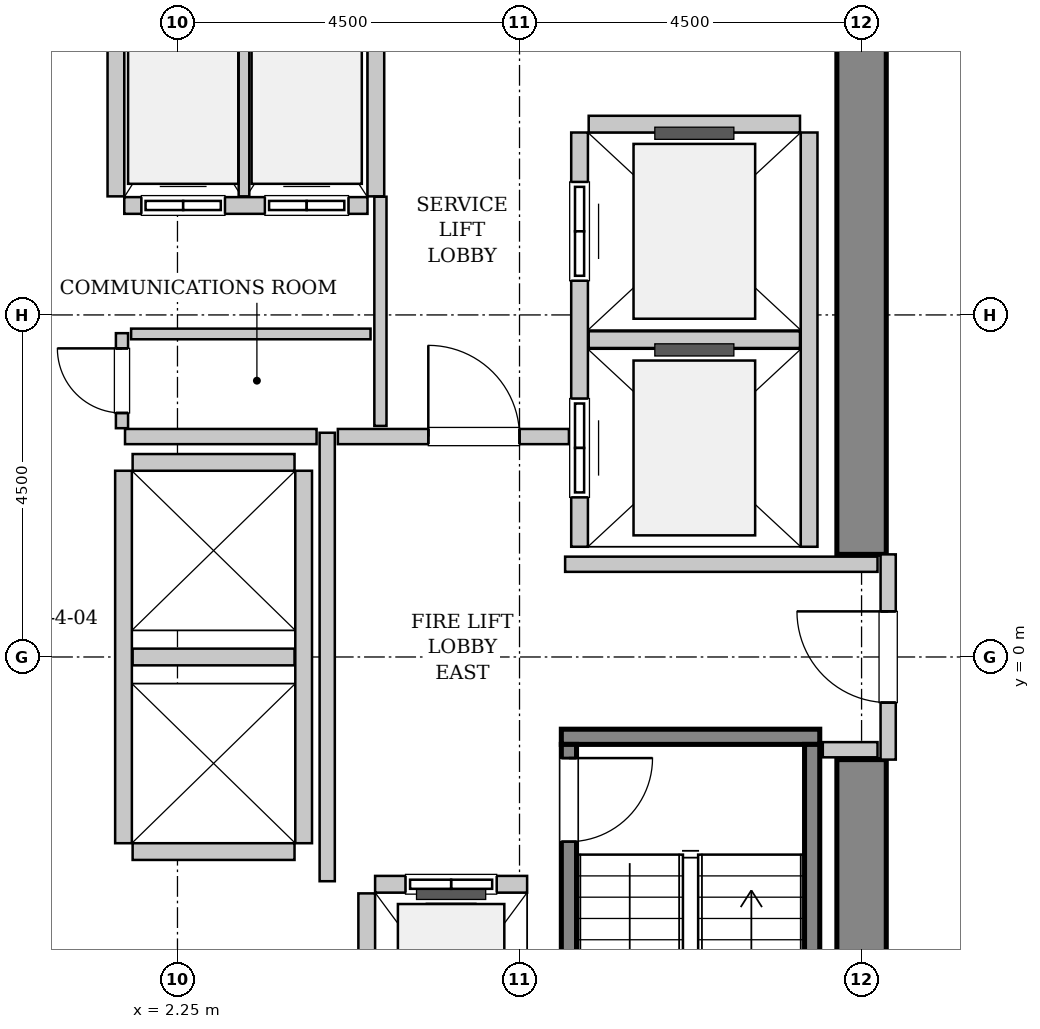
"""IFC4 building model, lengths in metres.
Left out: names, types, materials, properties, quantities, classifications, styles, units other than length and angle.
Written with IfcOpenShell. Run it as: python <this file> out.ifc"""

import sys

from ifc_helpers import new_model, si_unit, direction, frame, frame_2d, origin, place, context, subcontext, project, spatial, rectangle, extrude, source, transform, mapped, element, fill, save


model = new_model("IFC4")
c1 = context("Model", 3, precision=1e-05, world=origin(), true_north=direction((0.0, 1.0)))
c2 = subcontext(c1, "Body", "Model", "MODEL_VIEW")
j1 = project(units=[si_unit("LENGTHUNIT", "METRE"), si_unit("PLANEANGLEUNIT", "RADIAN")], contexts=[c1])
p1 = place(None, origin())
s1 = spatial("IfcSite", under=j1, at=p1, CompositionType="ELEMENT")
p2 = place(p1, origin())
s2 = spatial("IfcBuilding", under=s1, at=p2, CompositionType="ELEMENT")
p3 = place(p2, frame((0.0, 0.0, 11.4)))
s3 = spatial("IfcBuildingStorey", under=s2, at=p3, CompositionType="ELEMENT", Elevation=11.4)
m1 = source(origin(), c2, "Body", "SweptSolid", [
    extrude(rectangle(XDim=7.325, YDim=0.65, at=frame_2d((3.663, 0.0))), origin(), (0.0, 0.0, 1.0), 5.4),
])
for number, where, z_axis, x_axis in (
    (1, (11.25, -8.675, 0.0), (0.0, 0.0, 1.0), (0.0, 1.0, 0.0)),
    (2, (11.25, 1.35, 0.0), (0.0, 0.0, 1.0), (0.0, 1.0, 0.0)),
):
    element("IfcWall", number, at=place(p3, frame(where, z_axis=z_axis, x_axis=x_axis)), inside=s3, PredefinedType="SHEAR", context=c2, shape_type="MappedRepresentation", body=[
        mapped(m1, transform((0.0, 0.0, 0.0), x_axis=(1.0, 0.0, 0.0), y_axis=(0.0, 1.0, 0.0), z_axis=(0.0, 0.0, 1.0), scale=1.0)),
    ])
m2 = source(origin(), c2, "Body", "SweptSolid", [
    extrude(rectangle(XDim=3.4, YDim=0.2, at=frame_2d((1.7, 0.0))), origin(), (0.0, 0.0, 1.0), 5.4),
])
p4 = place(p3, frame((7.3, -1.05, 0.0), z_axis=(0.0, 0.0, 1.0), x_axis=(1.0, 0.0, 0.0)))
e3 = element("IfcWall", 3, at=p4, inside=s3, PredefinedType="SOLIDWALL", context=c2, shape_type="MappedRepresentation", body=[
    mapped(m2, transform((0.0, 0.0, 0.0), x_axis=(1.0, 0.0, 0.0), y_axis=(0.0, 1.0, 0.0), z_axis=(0.0, 0.0, 1.0), scale=1.0)),
])
m3 = source(origin(), c2, "Body", "SweptSolid", [
    extrude(rectangle(XDim=7.1, YDim=0.2, at=frame_2d((3.55, 0.0))), origin(), (0.0, 0.0, 1.0), 5.4),
])
p5 = place(p3, frame((7.4, -1.15, 0.0), z_axis=(0.0, 0.0, 1.0), x_axis=(0.0, -1.0, 0.0)))
e4 = element("IfcWall", 4, at=p5, inside=s3, PredefinedType="SOLIDWALL", context=c2, shape_type="MappedRepresentation", body=[
    mapped(m3, transform((0.0, 0.0, 0.0), x_axis=(1.0, 0.0, 0.0), y_axis=(0.0, 1.0, 0.0), z_axis=(0.0, 0.0, 1.0), scale=1.0)),
])
p6 = place(p5, frame((0.18, 0.0, 0.0)))
e5 = element("IfcOpeningElement", 5, at=p6, cuts=e4, PredefinedType="OPENING", context=c2, shape_type="SweptSolid", body=[
    extrude(rectangle(XDim=1.1, YDim=2.15, at=frame_2d((0.55, 1.075))), frame((0.0, 0.11, 0.0), z_axis=(0.0, -1.0, 0.0), x_axis=(1.0, 0.0, 0.0)), (0.0, 0.0, 1.0), 0.22),
])
p7 = place(p3, frame((10.6, -1.15, 0.0), z_axis=(0.0, 0.0, 1.0), x_axis=(0.0, -1.0, 0.0)))
e6 = element("IfcWall", 6, at=p7, inside=s3, PredefinedType="SOLIDWALL", context=c2, shape_type="MappedRepresentation", body=[
    mapped(m3, transform((0.0, 0.0, 0.0), x_axis=(1.0, 0.0, 0.0), y_axis=(0.0, 1.0, 0.0), z_axis=(0.0, 0.0, 1.0), scale=1.0)),
])
m4 = source(origin(), c2, "Body", "SweptSolid", [
    extrude(rectangle(XDim=2.0, YDim=0.22, at=frame_2d((1.0, 0.0))), origin(), (0.0, 0.0, 1.0), 5.085),
])
p8 = place(p3, frame((6.85, -2.99, 0.0), z_axis=(0.0, 0.0, 1.0), x_axis=(-1.0, 0.0, 0.0)))
e7 = element("IfcWall", 7, at=p8, inside=s3, PredefinedType="SOLIDWALL", context=c2, shape_type="MappedRepresentation", body=[
    mapped(m4, transform((0.0, 0.0, 0.0), x_axis=(1.0, 0.0, 0.0), y_axis=(0.0, 1.0, 0.0), z_axis=(0.0, 0.0, 1.0), scale=1.0)),
])
p9 = place(p8, frame((0.4, 0.0, 0.0)))
e8 = element("IfcOpeningElement", 8, at=p9, cuts=e7, PredefinedType="OPENING", context=c2, shape_type="SweptSolid", body=[
    extrude(rectangle(XDim=1.2, YDim=2.2, at=frame_2d((0.6, 1.1))), frame((0.0, 0.12, 0.0), z_axis=(0.0, -1.0, 0.0), x_axis=(1.0, 0.0, 0.0)), (0.0, 0.0, 1.0), 0.24),
])
m5 = source(origin(), c2, "Body", "SweptSolid", [
    extrude(rectangle(XDim=2.68, YDim=0.22, at=frame_2d((1.34, 0.0))), origin(), (0.0, 0.0, 1.0), 5.085),
])
p10 = place(p3, frame((4.74, -3.11, 0.0), z_axis=(0.0, 0.0, 1.0), x_axis=(0.0, -1.0, 0.0)))
e9 = element("IfcWall", 9, at=p10, inside=s3, PredefinedType="SOLIDWALL", context=c2, shape_type="MappedRepresentation", body=[
    mapped(m5, transform((0.0, 0.0, 0.0), x_axis=(1.0, 0.0, 0.0), y_axis=(0.0, 1.0, 0.0), z_axis=(0.0, 0.0, 1.0), scale=1.0)),
])
m6 = source(origin(), c2, "Body", "SweptSolid", [
    extrude(rectangle(XDim=5.45, YDim=0.22, at=frame_2d((2.725, 0.0))), origin(), (0.0, 0.0, 1.0), 5.085),
])
p11 = place(p3, frame((7.54, 6.9, 0.0), z_axis=(0.0, 0.0, 1.0), x_axis=(0.0, -1.0, 0.0)))
e10 = element("IfcWall", 10, at=p11, inside=s3, PredefinedType="SOLIDWALL", context=c2, shape_type="MappedRepresentation", body=[
    mapped(m6, transform((0.0, 0.0, 0.0), x_axis=(1.0, 0.0, 0.0), y_axis=(0.0, 1.0, 0.0), z_axis=(0.0, 0.0, 1.0), scale=1.0)),
])
p12 = place(p11, frame((3.5, 0.0, 0.0)))
e11 = element("IfcOpeningElement", 11, at=p12, cuts=e10, PredefinedType="OPENING", context=c2, shape_type="SweptSolid", body=[
    extrude(rectangle(XDim=1.3, YDim=2.3, at=frame_2d((0.65, 1.15))), frame((0.0, 0.12, 0.0), z_axis=(0.0, -1.0, 0.0), x_axis=(1.0, 0.0, 0.0)), (0.0, 0.0, 1.0), 0.24),
])
p13 = place(p11, frame((0.65, 0.0, 0.0)))
e12 = element("IfcOpeningElement", 12, at=p13, cuts=e10, PredefinedType="OPENING", context=c2, shape_type="SweptSolid", body=[
    extrude(rectangle(XDim=1.3, YDim=2.3, at=frame_2d((0.65, 1.15))), frame((0.0, 0.12, 0.0), z_axis=(0.0, -1.0, 0.0), x_axis=(1.0, 0.0, 0.0)), (0.0, 0.0, 1.0), 0.24),
])
p14 = place(p3, frame((10.56, 1.45, 0.0), z_axis=(0.0, 0.0, 1.0), x_axis=(0.0, 1.0, 0.0)))
e13 = element("IfcWall", 13, at=p14, inside=s3, PredefinedType="SOLIDWALL", context=c2, shape_type="MappedRepresentation", body=[
    mapped(m6, transform((0.0, 0.0, 0.0), x_axis=(1.0, 0.0, 0.0), y_axis=(0.0, 1.0, 0.0), z_axis=(0.0, 0.0, 1.0), scale=1.0)),
])
m7 = source(origin(), c2, "Body", "SweptSolid", [
    extrude(rectangle(XDim=2.78, YDim=0.22, at=frame_2d((1.39, 0.0))), origin(), (0.0, 0.0, 1.0), 5.085),
])
for number, where, z_axis, x_axis in (
    (14, (7.66, 4.175, 0.0), (0.0, 0.0, 1.0), (1.0, 0.0, 0.0)),
    (15, (10.44, 7.01, 0.0), (0.0, 0.0, 1.0), (-1.0, 0.0, 0.0)),
):
    element("IfcWall", number, at=place(p3, frame(where, z_axis=z_axis, x_axis=x_axis)), inside=s3, PredefinedType="SOLIDWALL", context=c2, shape_type="MappedRepresentation", body=[
        mapped(m7, transform((0.0, 0.0, 0.0), x_axis=(1.0, 0.0, 0.0), y_axis=(0.0, 1.0, 0.0), z_axis=(0.0, 0.0, 1.0), scale=1.0)),
    ])
m8 = source(origin(), c2, "Body", "SweptSolid", [
    extrude(rectangle(XDim=3.2, YDim=0.22, at=frame_2d((1.6, 0.0))), origin(), (0.0, 0.0, 1.0), 5.085),
])
p15 = place(p3, frame((1.55, 5.94, 0.0), z_axis=(0.0, 0.0, 1.0), x_axis=(1.0, 0.0, 0.0)))
e16 = element("IfcWall", 16, at=p15, inside=s3, PredefinedType="SOLIDWALL", context=c2, shape_type="MappedRepresentation", body=[
    mapped(m8, transform((0.0, 0.0, 0.0), x_axis=(1.0, 0.0, 0.0), y_axis=(0.0, 1.0, 0.0), z_axis=(0.0, 0.0, 1.0), scale=1.0)),
])
p16 = place(p15, frame((0.225, 0.0, 0.0)))
e17 = element("IfcOpeningElement", 17, at=p16, cuts=e16, PredefinedType="OPENING", context=c2, shape_type="SweptSolid", body=[
    extrude(rectangle(XDim=1.1, YDim=2.2, at=frame_2d((0.55, 1.1))), frame((0.0, 0.12, 0.0), z_axis=(0.0, -1.0, 0.0), x_axis=(1.0, 0.0, 0.0)), (0.0, 0.0, 1.0), 0.24),
])
p17 = place(p15, frame((1.85, 0.0, 0.0)))
e18 = element("IfcOpeningElement", 18, at=p17, cuts=e16, PredefinedType="OPENING", context=c2, shape_type="SweptSolid", body=[
    extrude(rectangle(XDim=1.1, YDim=2.2, at=frame_2d((0.55, 1.1))), frame((0.0, 0.12, 0.0), z_axis=(0.0, -1.0, 0.0), x_axis=(1.0, 0.0, 0.0)), (0.0, 0.0, 1.0), 0.24),
])
m9 = source(origin(), c2, "Body", "SweptSolid", [
    extrude(rectangle(XDim=2.43, YDim=0.22, at=frame_2d((1.215, 0.0))), origin(), (0.0, 0.0, 1.0), 5.085),
])
p18 = place(p3, frame((1.44, 8.49, 0.0), z_axis=(0.0, 0.0, 1.0), x_axis=(0.0, -1.0, 0.0)))
e19 = element("IfcWall", 19, at=p18, inside=s3, PredefinedType="SOLIDWALL", context=c2, shape_type="MappedRepresentation", body=[
    mapped(m9, transform((0.0, 0.0, 0.0), x_axis=(1.0, 0.0, 0.0), y_axis=(0.0, 1.0, 0.0), z_axis=(0.0, 0.0, 1.0), scale=1.0)),
])
m10 = source(origin(), c2, "Body", "SweptSolid", [
    extrude(rectangle(XDim=2.43, YDim=0.14, at=frame_2d((1.215, 0.0))), origin(), (0.0, 0.0, 1.0), 5.085),
])
p19 = place(p3, frame((3.125, 6.06, 0.0), z_axis=(0.0, 0.0, 1.0), x_axis=(0.0, 1.0, 0.0)))
e20 = element("IfcWall", 20, at=p19, inside=s3, PredefinedType="PARTITIONING", context=c2, shape_type="MappedRepresentation", body=[
    mapped(m10, transform((0.0, 0.0, 0.0), x_axis=(1.0, 0.0, 0.0), y_axis=(0.0, 1.0, 0.0), z_axis=(0.0, 0.0, 1.0), scale=1.0)),
])
p20 = place(p3, frame((4.86, 6.06, 0.0), z_axis=(0.0, 0.0, 1.0), x_axis=(0.0, 1.0, 0.0)))
e21 = element("IfcWall", 21, at=p20, inside=s3, PredefinedType="SOLIDWALL", context=c2, shape_type="MappedRepresentation", body=[
    mapped(m9, transform((0.0, 0.0, 0.0), x_axis=(1.0, 0.0, 0.0), y_axis=(0.0, 1.0, 0.0), z_axis=(0.0, 0.0, 1.0), scale=1.0)),
])
m11 = source(origin(), c2, "Body", "SweptSolid", [
    extrude(rectangle(XDim=4.9, YDim=0.22, at=frame_2d((2.45, 0.0))), origin(), (0.0, 0.0, 1.0), 5.085),
])
for number, where, z_axis, x_axis in (
    (22, (1.54, 2.45, 0.0), (0.0, 0.0, 1.0), (0.0, -1.0, 0.0)),
    (23, (3.91, -2.45, 0.0), (0.0, 0.0, 1.0), (0.0, 1.0, 0.0)),
):
    element("IfcWall", number, at=place(p3, frame(where, z_axis=z_axis, x_axis=x_axis)), inside=s3, PredefinedType="SOLIDWALL", context=c2, shape_type="MappedRepresentation", body=[
        mapped(m11, transform((0.0, 0.0, 0.0), x_axis=(1.0, 0.0, 0.0), y_axis=(0.0, 1.0, 0.0), z_axis=(0.0, 0.0, 1.0), scale=1.0)),
    ])
m12 = source(origin(), c2, "Body", "SweptSolid", [
    extrude(rectangle(XDim=2.13, YDim=0.22, at=frame_2d((1.065, 0.0))), origin(), (0.0, 0.0, 1.0), 5.085),
])
for number, where, z_axis, x_axis in (
    (24, (1.66, -2.56, 0.0), (0.0, 0.0, 1.0), (1.0, 0.0, 0.0)),
    (25, (1.66, 0.0, 0.0), (0.0, 0.0, 1.0), (1.0, 0.0, 0.0)),
    (26, (3.79, 2.56, 0.0), (0.0, 0.0, 1.0), (-1.0, 0.0, 0.0)),
):
    element("IfcWall", number, at=place(p3, frame(where, z_axis=z_axis, x_axis=x_axis)), inside=s3, PredefinedType="SOLIDWALL", context=c2, shape_type="MappedRepresentation", body=[
        mapped(m12, transform((0.0, 0.0, 0.0), x_axis=(1.0, 0.0, 0.0), y_axis=(0.0, 1.0, 0.0), z_axis=(0.0, 0.0, 1.0), scale=1.0)),
    ])
m13 = source(origin(), c2, "Body", "SweptSolid", [
    extrude(rectangle(XDim=2.7, YDim=0.2, at=frame_2d((1.35, 0.0))), origin(), (0.0, 0.0, 1.0), 3.975),
])
p21 = place(p3, frame((11.6, -1.35, 0.0), z_axis=(0.0, 0.0, 1.0), x_axis=(0.0, 1.0, 0.0)))
e27 = element("IfcWall", 27, at=p21, inside=s3, PredefinedType="PARTITIONING", context=c2, shape_type="MappedRepresentation", body=[
    mapped(m13, transform((0.0, 0.0, 0.0), x_axis=(1.0, 0.0, 0.0), y_axis=(0.0, 1.0, 0.0), z_axis=(0.0, 0.0, 1.0), scale=1.0)),
])
p22 = place(p21, frame((0.75, 0.0, 0.0)))
e28 = element("IfcOpeningElement", 28, at=p22, cuts=e27, PredefinedType="OPENING", context=c2, shape_type="SweptSolid", body=[
    extrude(rectangle(XDim=1.2, YDim=2.15, at=frame_2d((0.6, 1.075))), frame((0.0, 0.11, 0.0), z_axis=(0.0, -1.0, 0.0), x_axis=(1.0, 0.0, 0.0)), (0.0, 0.0, 1.0), 0.22),
])
m14 = source(origin(), c2, "Body", "SweptSolid", [
    extrude(rectangle(XDim=5.9, YDim=0.2, at=frame_2d((2.95, 0.0))), origin(), (0.0, 0.0, 1.0), 5.085),
])
p23 = place(p3, frame((4.22, -2.95, 0.0), z_axis=(0.0, 0.0, 1.0), x_axis=(0.0, 1.0, 0.0)))
e29 = element("IfcWall", 29, at=p23, inside=s3, PredefinedType="PARTITIONING", context=c2, shape_type="MappedRepresentation", body=[
    mapped(m14, transform((0.0, 0.0, 0.0), x_axis=(1.0, 0.0, 0.0), y_axis=(0.0, 1.0, 0.0), z_axis=(0.0, 0.0, 1.0), scale=1.0)),
])
m15 = source(origin(), c2, "Body", "SweptSolid", [
    extrude(rectangle(XDim=2.52, YDim=0.2, at=frame_2d((1.26, 0.0))), origin(), (0.0, 0.0, 1.0), 5.085),
])
p24 = place(p3, frame((1.56, 2.9, 0.0), z_axis=(0.0, 0.0, 1.0), x_axis=(1.0, 0.0, 0.0)))
e30 = element("IfcWall", 30, at=p24, inside=s3, PredefinedType="PARTITIONING", context=c2, shape_type="MappedRepresentation", body=[
    mapped(m15, transform((0.0, 0.0, 0.0), x_axis=(1.0, 0.0, 0.0), y_axis=(0.0, 1.0, 0.0), z_axis=(0.0, 0.0, 1.0), scale=1.0)),
])
m16 = source(origin(), c2, "Body", "SweptSolid", [
    extrude(rectangle(XDim=3.04, YDim=0.2, at=frame_2d((1.52, 0.0))), origin(), (0.0, 0.0, 1.0), 5.085),
])
p25 = place(p3, frame((4.36, 2.9, 0.0), z_axis=(0.0, 0.0, 1.0), x_axis=(1.0, 0.0, 0.0)))
e31 = element("IfcWall", 31, at=p25, inside=s3, PredefinedType="PARTITIONING", context=c2, shape_type="MappedRepresentation", body=[
    mapped(m16, transform((0.0, 0.0, 0.0), x_axis=(1.0, 0.0, 0.0), y_axis=(0.0, 1.0, 0.0), z_axis=(0.0, 0.0, 1.0), scale=1.0)),
])
p26 = place(p25, frame((1.19, 0.0, 0.0)))
e32 = element("IfcOpeningElement", 32, at=p26, cuts=e31, PredefinedType="OPENING", context=c2, shape_type="SweptSolid", body=[
    extrude(rectangle(XDim=1.2, YDim=2.15, at=frame_2d((0.6, 1.075))), frame((0.0, 0.11, 0.0), z_axis=(0.0, -1.0, 0.0), x_axis=(1.0, 0.0, 0.0)), (0.0, 0.0, 1.0), 0.22),
])
m17 = source(origin(), c2, "Body", "SweptSolid", [
    extrude(rectangle(XDim=4.11, YDim=0.2, at=frame_2d((2.055, 0.0))), origin(), (0.0, 0.0, 1.0), 5.085),
])
p27 = place(p3, frame((7.35, 1.22, 0.0), z_axis=(0.0, 0.0, 1.0), x_axis=(1.0, 0.0, 0.0)))
e33 = element("IfcWall", 33, at=p27, inside=s3, PredefinedType="PARTITIONING", context=c2, shape_type="MappedRepresentation", body=[
    mapped(m17, transform((0.0, 0.0, 0.0), x_axis=(1.0, 0.0, 0.0), y_axis=(0.0, 1.0, 0.0), z_axis=(0.0, 0.0, 1.0), scale=1.0)),
])
m18 = source(origin(), c2, "Body", "SweptSolid", [
    extrude(rectangle(XDim=0.72, YDim=0.2, at=frame_2d((0.36, 0.0))), origin(), (0.0, 0.0, 1.0), 5.085),
])
p28 = place(p3, frame((10.74, -1.22, 0.0), z_axis=(0.0, 0.0, 1.0), x_axis=(1.0, 0.0, 0.0)))
e34 = element("IfcWall", 34, at=p28, inside=s3, PredefinedType="PARTITIONING", context=c2, shape_type="MappedRepresentation", body=[
    mapped(m18, transform((0.0, 0.0, 0.0), x_axis=(1.0, 0.0, 0.0), y_axis=(0.0, 1.0, 0.0), z_axis=(0.0, 0.0, 1.0), scale=1.0)),
])
m19 = source(origin(), c2, "Body", "SweptSolid", [
    extrude(rectangle(XDim=3.015, YDim=0.16, at=frame_2d((1.507, 0.0))), origin(), (0.0, 0.0, 1.0), 5.085),
])
p29 = place(p3, frame((4.92, 3.04, 0.0), z_axis=(0.0, 0.0, 1.0), x_axis=(0.0, 1.0, 0.0)))
e35 = element("IfcWall", 35, at=p29, inside=s3, PredefinedType="PARTITIONING", context=c2, shape_type="MappedRepresentation", body=[
    mapped(m19, transform((0.0, 0.0, 0.0), x_axis=(1.0, 0.0, 0.0), y_axis=(0.0, 1.0, 0.0), z_axis=(0.0, 0.0, 1.0), scale=1.0)),
])
m20 = source(origin(), c2, "Body", "SweptSolid", [
    extrude(rectangle(XDim=1.25, YDim=0.16, at=frame_2d((0.625, 0.0))), origin(), (0.0, 0.0, 1.0), 5.085),
])
p30 = place(p3, frame((1.52, 3.01, 0.0), z_axis=(0.0, 0.0, 1.0), x_axis=(0.0, 1.0, 0.0)))
e36 = element("IfcWall", 36, at=p30, inside=s3, PredefinedType="PARTITIONING", context=c2, shape_type="MappedRepresentation", body=[
    mapped(m20, transform((0.0, 0.0, 0.0), x_axis=(1.0, 0.0, 0.0), y_axis=(0.0, 1.0, 0.0), z_axis=(0.0, 0.0, 1.0), scale=1.0)),
])
p31 = place(p30, frame((0.2, 0.0, 0.0)))
e37 = element("IfcOpeningElement", 37, at=p31, cuts=e36, PredefinedType="OPENING", context=c2, shape_type="SweptSolid", body=[
    extrude(rectangle(XDim=0.85, YDim=2.1, at=frame_2d((0.425, 1.05))), frame((0.0, 0.09, 0.0), z_axis=(0.0, -1.0, 0.0), x_axis=(1.0, 0.0, 0.0)), (0.0, 0.0, 1.0), 0.18),
])
m21 = source(origin(), c2, "Body", "SweptSolid", [
    extrude(rectangle(XDim=3.15, YDim=0.14, at=frame_2d((1.575, 0.0))), origin(), (0.0, 0.0, 1.0), 5.085),
])
p32 = place(p3, frame((1.64, 4.25, 0.0), z_axis=(0.0, 0.0, 1.0), x_axis=(1.0, 0.0, 0.0)))
e38 = element("IfcWall", 38, at=p32, inside=s3, PredefinedType="PARTITIONING", context=c2, shape_type="MappedRepresentation", body=[
    mapped(m21, transform((0.0, 0.0, 0.0), x_axis=(1.0, 0.0, 0.0), y_axis=(0.0, 1.0, 0.0), z_axis=(0.0, 0.0, 1.0), scale=1.0)),
])
m22 = source(origin(), c2, "Body", "SweptSolid", [
    extrude(rectangle(XDim=1.1, YDim=2.15, at=frame_2d((0.55, 1.075))), frame((0.0, 0.025, 0.0), z_axis=(0.0, -1.0, 0.0), x_axis=(1.0, 0.0, 0.0)), (0.0, 0.0, 1.0), 0.05),
])
p33 = place(p6, origin())
e39 = element("IfcDoor", 39, at=p33, inside=s3, OperationType="SINGLE_SWING_LEFT", PredefinedType="DOOR", context=c2, shape_type="MappedRepresentation", body=[
    mapped(m22, transform((0.0, 0.0, 0.0), x_axis=(1.0, 0.0, 0.0), y_axis=(0.0, 1.0, 0.0), z_axis=(0.0, 0.0, 1.0), scale=1.0)),
])
fill(e5, e39)
m23 = source(origin(), c2, "Body", "SweptSolid", [
    extrude(rectangle(XDim=1.2, YDim=2.2, at=frame_2d((0.6, 1.1))), frame((0.0, 0.025, 0.0), z_axis=(0.0, -1.0, 0.0), x_axis=(1.0, 0.0, 0.0)), (0.0, 0.0, 1.0), 0.05),
])
p34 = place(p9, origin())
e40 = element("IfcDoor", 40, at=p34, inside=s3, OperationType="SLIDING_TO_LEFT", PredefinedType="DOOR", context=c2, shape_type="MappedRepresentation", body=[
    mapped(m23, transform((0.0, 0.0, 0.0), x_axis=(1.0, 0.0, 0.0), y_axis=(0.0, 1.0, 0.0), z_axis=(0.0, 0.0, 1.0), scale=1.0)),
])
fill(e8, e40)
m24 = source(origin(), c2, "Body", "SweptSolid", [
    extrude(rectangle(XDim=1.3, YDim=2.3, at=frame_2d((0.65, 1.15))), frame((0.0, 0.025, 0.0), z_axis=(0.0, -1.0, 0.0), x_axis=(1.0, 0.0, 0.0)), (0.0, 0.0, 1.0), 0.05),
])
p35 = place(p12, origin())
e41 = element("IfcDoor", 41, at=p35, inside=s3, OperationType="SLIDING_TO_RIGHT", PredefinedType="DOOR", context=c2, shape_type="MappedRepresentation", body=[
    mapped(m24, transform((0.0, 0.0, 0.0), x_axis=(1.0, 0.0, 0.0), y_axis=(0.0, 1.0, 0.0), z_axis=(0.0, 0.0, 1.0), scale=1.0)),
])
fill(e11, e41)
p36 = place(p13, origin())
e42 = element("IfcDoor", 42, at=p36, inside=s3, OperationType="SLIDING_TO_RIGHT", PredefinedType="DOOR", context=c2, shape_type="MappedRepresentation", body=[
    mapped(m24, transform((0.0, 0.0, 0.0), x_axis=(1.0, 0.0, 0.0), y_axis=(0.0, 1.0, 0.0), z_axis=(0.0, 0.0, 1.0), scale=1.0)),
])
fill(e12, e42)
m25 = source(origin(), c2, "Body", "SweptSolid", [
    extrude(rectangle(XDim=1.1, YDim=2.2, at=frame_2d((0.55, 1.1))), frame((0.0, 0.025, 0.0), z_axis=(0.0, -1.0, 0.0), x_axis=(1.0, 0.0, 0.0)), (0.0, 0.0, 1.0), 0.05),
])
p37 = place(p16, origin())
e43 = element("IfcDoor", 43, at=p37, inside=s3, OperationType="DOUBLE_DOOR_SLIDING", PredefinedType="DOOR", context=c2, shape_type="MappedRepresentation", body=[
    mapped(m25, transform((0.0, 0.0, 0.0), x_axis=(1.0, 0.0, 0.0), y_axis=(0.0, 1.0, 0.0), z_axis=(0.0, 0.0, 1.0), scale=1.0)),
])
fill(e17, e43)
p38 = place(p17, origin())
e44 = element("IfcDoor", 44, at=p38, inside=s3, OperationType="DOUBLE_DOOR_SLIDING", PredefinedType="DOOR", context=c2, shape_type="MappedRepresentation", body=[
    mapped(m25, transform((0.0, 0.0, 0.0), x_axis=(1.0, 0.0, 0.0), y_axis=(0.0, 1.0, 0.0), z_axis=(0.0, 0.0, 1.0), scale=1.0)),
])
fill(e18, e44)
m26 = source(origin(), c2, "Body", "SweptSolid", [
    extrude(rectangle(XDim=1.2, YDim=2.15, at=frame_2d((0.6, 1.075))), frame((0.0, 0.025, 0.0), z_axis=(0.0, -1.0, 0.0), x_axis=(1.0, 0.0, 0.0)), (0.0, 0.0, 1.0), 0.05),
])
p39 = place(p22, origin())
e45 = element("IfcDoor", 45, at=p39, inside=s3, OperationType="SINGLE_SWING_RIGHT", PredefinedType="DOOR", context=c2, shape_type="MappedRepresentation", body=[
    mapped(m26, transform((0.0, 0.0, 0.0), x_axis=(1.0, 0.0, 0.0), y_axis=(0.0, 1.0, 0.0), z_axis=(0.0, 0.0, 1.0), scale=1.0)),
])
fill(e28, e45)
p40 = place(p26, origin())
e46 = element("IfcDoor", 46, at=p40, inside=s3, OperationType="SINGLE_SWING_LEFT", PredefinedType="DOOR", context=c2, shape_type="MappedRepresentation", body=[
    mapped(m26, transform((0.0, 0.0, 0.0), x_axis=(1.0, 0.0, 0.0), y_axis=(0.0, 1.0, 0.0), z_axis=(0.0, 0.0, 1.0), scale=1.0)),
])
fill(e32, e46)
m27 = source(origin(), c2, "Body", "SweptSolid", [
    extrude(rectangle(XDim=0.85, YDim=2.1, at=frame_2d((0.425, 1.05))), frame((0.0, 0.025, 0.0), z_axis=(0.0, -1.0, 0.0), x_axis=(1.0, 0.0, 0.0)), (0.0, 0.0, 1.0), 0.05),
])
p41 = place(p31, origin())
e47 = element("IfcDoor", 47, at=p41, inside=s3, OperationType="SINGLE_SWING_RIGHT", PredefinedType="DOOR", context=c2, shape_type="MappedRepresentation", body=[
    mapped(m27, transform((0.0, 0.0, 0.0), x_axis=(1.0, 0.0, 0.0), y_axis=(0.0, 1.0, 0.0), z_axis=(0.0, 0.0, 1.0), scale=1.0)),
])
fill(e37, e47)
save(model, sys.argv[1])
